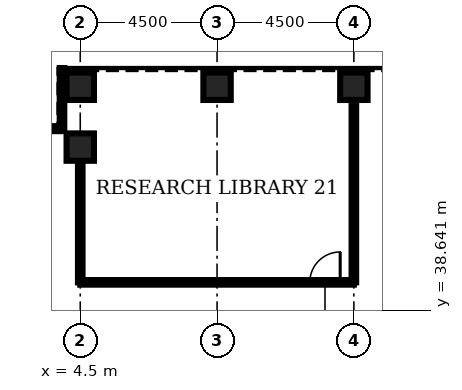
"""IFC4 building model, lengths in metres.
Left out: names, types, materials, properties, quantities, classifications, styles, units other than length and angle.
Written with IfcOpenShell. Run it as: python <this file> out.ifc"""

import sys

from ifc_helpers import new_model, si_unit, direction, frame, frame_2d, origin, origin_2d, place, context, subcontext, project, spatial, rectangle, hollow_rectangle, extrude, element, fill, save


model = new_model("IFC4")
c1 = context("Model", 3, precision=1e-05, world=origin(), true_north=direction((0.0, 1.0)))
c2 = subcontext(c1, "Body", "Model", "MODEL_VIEW")
j1 = project(units=[si_unit("LENGTHUNIT", "METRE"), si_unit("PLANEANGLEUNIT", "RADIAN")], contexts=[c1])
p1 = place(None, origin())
s1 = spatial("IfcSite", under=j1, at=p1, CompositionType="ELEMENT")
p2 = place(p1, origin())
s2 = spatial("IfcBuilding", under=s1, at=p2, CompositionType="ELEMENT")
p3 = place(p2, frame((0.0, 0.0, 86.0)))
s3 = spatial("IfcBuildingStorey", under=s2, at=p3, CompositionType="ELEMENT", Elevation=86.0)
for number, where, z_axis, x_axis in (
    (1, (13.5, 46.0, 0.0), (0.0, 0.0, 1.0), (0.0, 1.0, 0.0)),
    (2, (9.0, 46.0, 0.0), (0.0, 0.0, 1.0), (0.0, 1.0, 0.0)),
    (3, (4.5, 46.0, 0.0), (0.0, 0.0, 1.0), (0.0, 1.0, 0.0)),
    (4, (4.5, 44.0, 0.0), (0.0, 0.0, 1.0), (0.0, 1.0, 0.0)),
):
    element("IfcColumn", number, at=place(p3, frame(where, z_axis=z_axis, x_axis=x_axis)), inside=s3, PredefinedType="COLUMN", context=c2, shape_type="SweptSolid", body=[
        extrude(hollow_rectangle(XDim=0.9, YDim=0.9, WallThickness=0.11, at=origin_2d()), origin(), (0.0, 0.0, 1.0), 4.5),
    ])
p4 = place(p3, frame((4.5, 39.55, 0.0), z_axis=(0.0, 0.0, 1.0), x_axis=(1.0, 0.0, 0.0)))
e5 = element("IfcWall", 5, at=p4, inside=s3, PredefinedType="PARTITIONING", context=c2, shape_type="SweptSolid", body=[
    extrude(rectangle(XDim=9.0, YDim=0.15, at=frame_2d((4.5, 0.0))), origin(), (0.0, 0.0, 1.0), 3.0),
])
p5 = place(p4, frame((7.55, 0.0, 0.0)))
e6 = element("IfcOpeningElement", 6, at=p5, cuts=e5, PredefinedType="OPENING", context=c2, shape_type="SweptSolid", body=[
    extrude(rectangle(XDim=1.0, YDim=2.1, at=frame_2d((0.5, 1.05))), frame((0.0, 0.085, 0.0), z_axis=(0.0, -1.0, 0.0), x_axis=(1.0, 0.0, 0.0)), (0.0, 0.0, 1.0), 0.17),
])
p6 = place(p3, frame((4.5, 39.55, 0.0), z_axis=(0.0, 0.0, 1.0), x_axis=(0.0, 1.0, 0.0)))
e7 = element("IfcWall", 7, at=p6, inside=s3, PredefinedType="PARTITIONING", context=c2, shape_type="SweptSolid", body=[
    extrude(rectangle(XDim=4.0, YDim=0.15, at=frame_2d((2.0, 0.0))), origin(), (0.0, 0.0, 1.0), 3.0),
])
p7 = place(p3, frame((13.5, 39.55, 0.0), z_axis=(0.0, 0.0, 1.0), x_axis=(0.0, 1.0, 0.0)))
e8 = element("IfcWall", 8, at=p7, inside=s3, PredefinedType="PARTITIONING", context=c2, shape_type="SweptSolid", body=[
    extrude(rectangle(XDim=6.0, YDim=0.15, at=frame_2d((3.0, 0.0))), origin(), (0.0, 0.0, 1.0), 3.0),
])
p8 = place(p3, frame((3.9, 46.6, 0.0), z_axis=(0.0, 0.0, 1.0), x_axis=(0.0, -1.0, 0.0)))
e9 = element("IfcWall", 9, at=p8, inside=s3, PredefinedType="ELEMENTEDWALL", context=c2, shape_type="SweptSolid", body=[
    extrude(rectangle(XDim=2.0, YDim=0.15, at=frame_2d((1.0, 0.0))), origin(), (0.0, 0.0, 1.0), 4.32),
])
p9 = place(p3, frame((3.9, 44.6, 0.0), z_axis=(0.0, 0.0, 1.0), x_axis=(-1.0, 0.0, 0.0)))
e10 = element("IfcWall", 10, at=p9, inside=s3, PredefinedType="ELEMENTEDWALL", context=c2, shape_type="SweptSolid", body=[
    extrude(rectangle(XDim=2.25, YDim=0.15, at=frame_2d((1.125, 0.0))), origin(), (0.0, 0.0, 1.0), 4.32),
])
p10 = place(p5, origin())
e11 = element("IfcDoor", 11, at=p10, inside=s3, OperationType="SINGLE_SWING_RIGHT", PredefinedType="DOOR", context=c2, shape_type="SweptSolid", body=[
    extrude(rectangle(XDim=1.0, YDim=2.1, at=frame_2d((0.5, 1.05))), frame((0.0, 0.025, 0.0), z_axis=(0.0, -1.0, 0.0), x_axis=(1.0, 0.0, 0.0)), (0.0, 0.0, 1.0), 0.05),
])
fill(e6, e11)
save(model, sys.argv[1])
